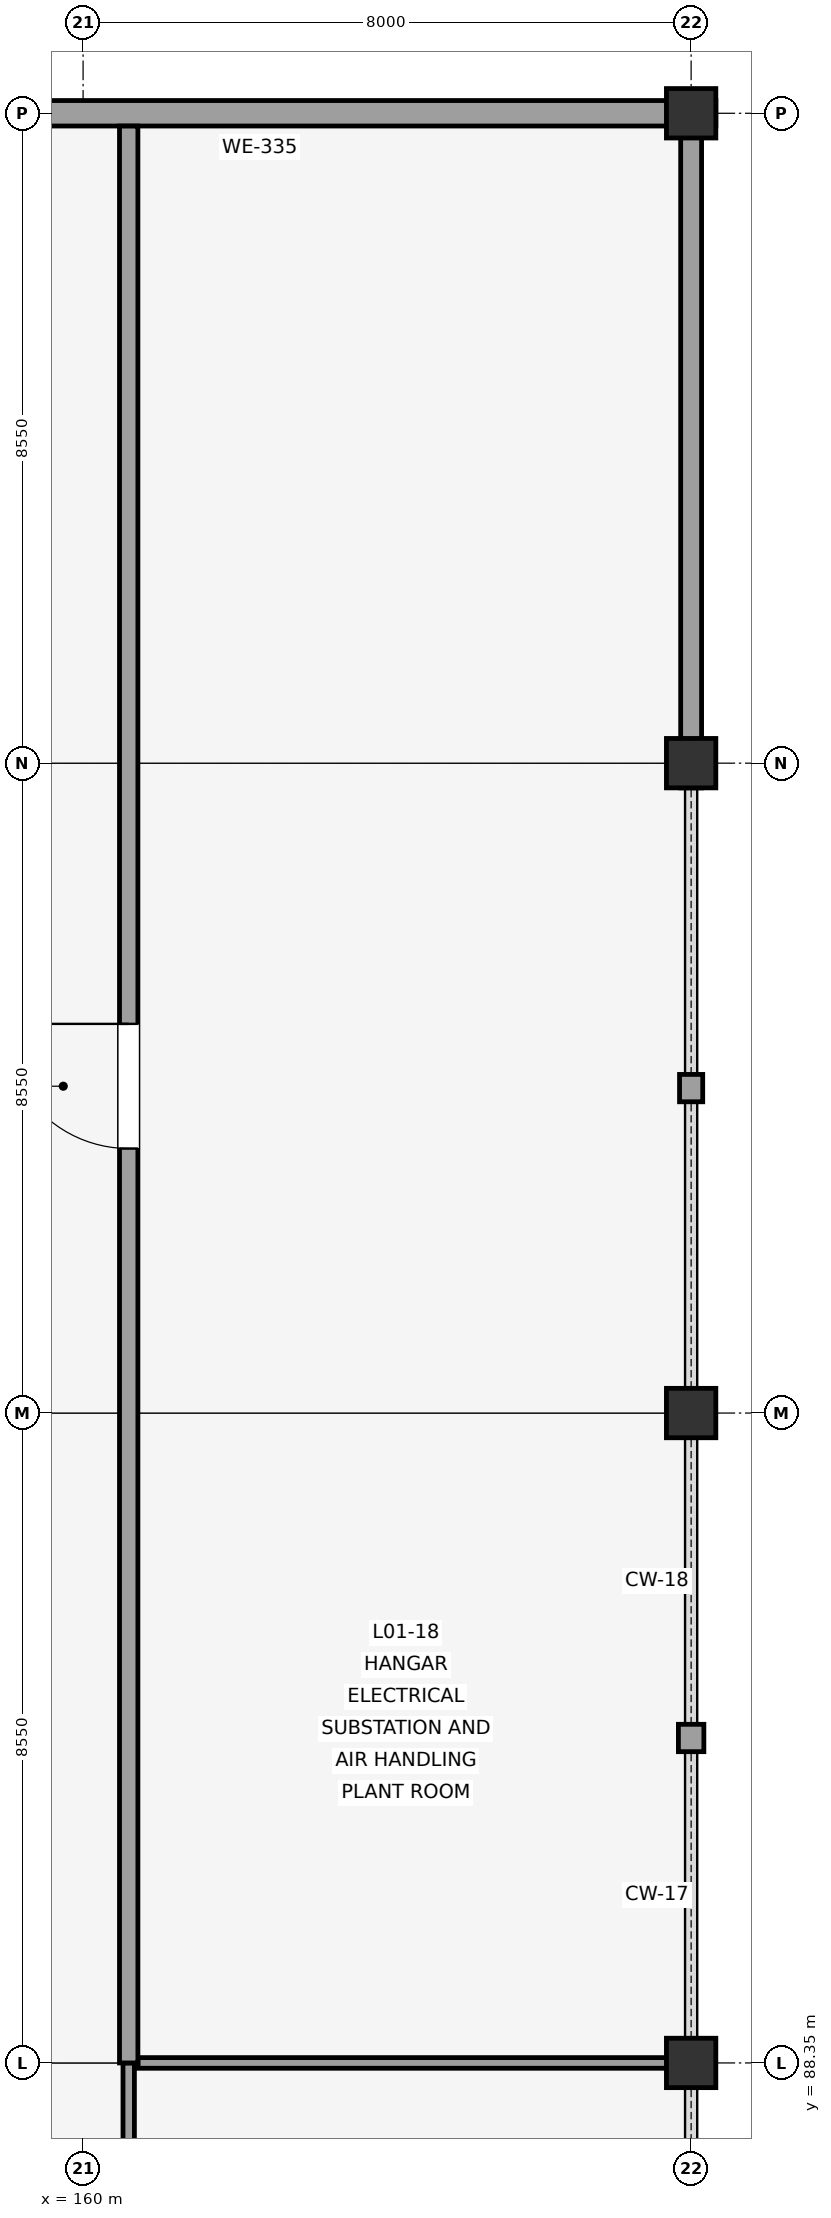
"""IFC4 building model, lengths in metres.
Left out: names, types, materials, properties, quantities, classifications, styles, units other than length and angle.
Written with IfcOpenShell. Run it as: python <this file> out.ifc"""

import sys

from ifc_helpers import new_model, si_unit, direction, frame, frame_2d, origin, origin_2d, place, context, subcontext, project, spatial, rectangle, extrude, element, fill, save


model = new_model("IFC4")
c1 = context("Model", 3, precision=1e-05, world=origin(), true_north=direction((0.0, 1.0)))
c2 = subcontext(c1, "Body", "Model", "MODEL_VIEW")
j1 = project(units=[si_unit("LENGTHUNIT", "METRE"), si_unit("PLANEANGLEUNIT", "RADIAN")], contexts=[c1])
p1 = place(None, origin())
s1 = spatial("IfcSite", under=j1, at=p1, CompositionType="ELEMENT")
p2 = place(p1, origin())
s2 = spatial("IfcBuilding", under=s1, at=p2, CompositionType="ELEMENT")
p3 = place(p2, frame((0.0, 0.0, 4.5)))
s3 = spatial("IfcBuildingStorey", under=s2, at=p3, CompositionType="ELEMENT", Elevation=4.5)
for number, where, z_axis, x_axis in (
    (1, (168.0, 88.35, 0.0), (0.0, 0.0, 1.0), (1.0, 0.0, 0.0)),
    (2, (168.0, 96.9, 0.0), (0.0, 0.0, 1.0), (1.0, 0.0, 0.0)),
    (3, (168.0, 105.45, 0.0), (0.0, 0.0, 1.0), (1.0, 0.0, 0.0)),
    (4, (168.0, 114.0, 0.0), (0.0, 0.0, 1.0), (1.0, 0.0, 0.0)),
):
    element("IfcColumn", number, at=place(p3, frame(where, z_axis=z_axis, x_axis=x_axis)), inside=s3, PredefinedType="COLUMN", context=c2, shape_type="SweptSolid", body=[
        extrude(rectangle(XDim=0.65, YDim=0.65, at=origin_2d()), origin(), (0.0, 0.0, 1.0), 4.5),
    ])
p4 = place(p3, frame((168.325, 114.0, 0.0), z_axis=(0.0, 0.0, 1.0), x_axis=(-1.0, 0.0, 0.0)))
e5 = element("IfcWall", 5, at=p4, inside=s3, PredefinedType="SOLIDWALL", context=c2, shape_type="SweptSolid", body=[
    extrude(rectangle(XDim=11.999, YDim=0.335, at=frame_2d((6.0, 0.0))), origin(), (0.0, 0.0, 1.0), 3.12),
])
p5 = place(p3, frame((168.0, 92.445, 0.0), z_axis=(0.0, 0.0, 1.0), x_axis=(0.0, 1.0, 0.0)))
e6 = element("IfcWall", 6, at=p5, inside=s3, PredefinedType="SOLIDWALL", context=c2, shape_type="SweptSolid", body=[
    extrude(rectangle(XDim=0.36, YDim=0.335, at=frame_2d((0.18, 0.0))), origin(), (0.0, 0.0, 1.0), 3.12),
])
p6 = place(p3, frame((168.0, 100.995, 0.0), z_axis=(0.0, 0.0, 1.0), x_axis=(0.0, 1.0, 0.0)))
e7 = element("IfcWall", 7, at=p6, inside=s3, PredefinedType="SOLIDWALL", context=c2, shape_type="SweptSolid", body=[
    extrude(rectangle(XDim=0.36, YDim=0.305, at=frame_2d((0.18, 0.0))), origin(), (0.0, 0.0, 1.0), 3.12),
])
p7 = place(p3, frame((168.0, 105.125, 0.0), z_axis=(0.0, 0.0, 1.0), x_axis=(0.0, 1.0, 0.0)))
e8 = element("IfcWall", 8, at=p7, inside=s3, PredefinedType="SOLIDWALL", context=c2, shape_type="SweptSolid", body=[
    extrude(rectangle(XDim=8.707, YDim=0.275, at=frame_2d((4.353, 0.0))), origin(), (0.0, 0.0, 1.0), 3.12),
])
p8 = place(p3, frame((160.6, 60.26, 0.0), z_axis=(0.0, 0.0, 1.0), x_axis=(0.0, 1.0, 0.0)))
e9 = element("IfcWall", 9, at=p8, inside=s3, PredefinedType="PARTITIONING", context=c2, shape_type="SweptSolid", body=[
    extrude(rectangle(XDim=28.09, YDim=0.15, at=frame_2d((14.045, 0.0))), origin(), (0.0, 0.0, 1.0), 2.7),
])
p9 = place(p8, frame((14.48, 0.0, 0.0)))
e10 = element("IfcOpeningElement", 10, at=p9, cuts=e9, PredefinedType="OPENING", context=c2, shape_type="SweptSolid", body=[
    extrude(rectangle(XDim=1.52, YDim=2.2, at=frame_2d((0.76, 1.1))), frame((0.0, 0.085, 0.0), z_axis=(0.0, -1.0, 0.0), x_axis=(1.0, 0.0, 0.0)), (0.0, 0.0, 1.0), 0.17),
])
p10 = place(p3, frame((160.722, 88.35, 0.0), z_axis=(0.0, 0.0, 1.0), x_axis=(1.0, 0.0, 0.0)))
e11 = element("IfcWall", 11, at=p10, inside=s3, PredefinedType="PARTITIONING", context=c2, shape_type="SweptSolid", body=[
    extrude(rectangle(XDim=7.078, YDim=0.14, at=frame_2d((3.539, 0.0))), origin(), (0.0, 0.0, 1.0), 2.7),
])
p11 = place(p3, frame((160.6, 88.35, 0.0), z_axis=(0.0, 0.0, 1.0), x_axis=(0.0, 1.0, 0.0)))
e12 = element("IfcWall", 12, at=p11, inside=s3, PredefinedType="SOLIDWALL", context=c2, shape_type="SweptSolid", body=[
    extrude(rectangle(XDim=25.481, YDim=0.242, at=frame_2d((12.741, 0.0))), origin(), (0.0, 0.0, 1.0), 2.7),
])
p12 = place(p11, frame((12.03, 0.0, 0.0)))
e13 = element("IfcOpeningElement", 13, at=p12, cuts=e12, PredefinedType="OPENING", context=c2, shape_type="SweptSolid", body=[
    extrude(rectangle(XDim=1.64, YDim=2.22, at=frame_2d((0.82, 1.11))), frame((0.0, 0.131, 0.0), z_axis=(0.0, -1.0, 0.0), x_axis=(1.0, 0.0, 0.0)), (0.0, 0.0, 1.0), 0.262),
])
p13 = place(p3, frame((167.8, 97.203, 0.0), z_axis=(0.0, 0.0, 1.0), x_axis=(0.0, -1.0, 0.0)))
e14 = element("IfcWall", 14, at=p13, inside=s3, PredefinedType="PARTITIONING", context=c2, shape_type="SweptSolid", body=[
    extrude(rectangle(XDim=0.606, YDim=0.235, at=frame_2d((0.303, 0.0))), origin(), (0.0, 0.0, 1.0), 2.7),
])
p14 = place(p12, origin())
e15 = element("IfcDoor", 15, at=p14, inside=s3, OperationType="SINGLE_SWING_RIGHT", PredefinedType="DOOR", context=c2, shape_type="SweptSolid", body=[
    extrude(rectangle(XDim=1.64, YDim=2.22, at=frame_2d((0.82, 1.11))), frame((0.0, 0.025, 0.0), z_axis=(0.0, -1.0, 0.0), x_axis=(1.0, 0.0, 0.0)), (0.0, 0.0, 1.0), 0.05),
])
fill(e13, e15)
save(model, sys.argv[1])
